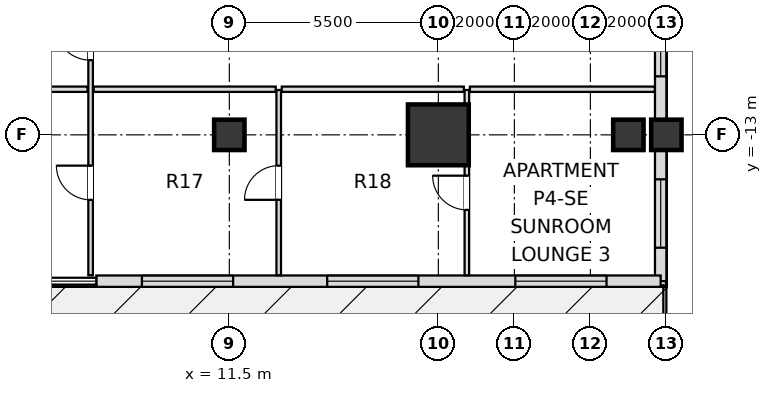
"""IFC4 building model, lengths in metres.
Left out: names, types, materials, properties, quantities, classifications, styles, units other than length and angle.
Written with IfcOpenShell. Run it as: python <this file> out.ifc"""

import sys

from ifc_helpers import new_model, si_unit, direction, frame, frame_2d, origin, origin_2d, place, context, subcontext, project, spatial, rectangle, extrude, element, fill, save


model = new_model("IFC4")
c1 = context("Model", 3, precision=1e-05, world=origin(), true_north=direction((0.0, 1.0)))
c2 = subcontext(c1, "Body", "Model", "MODEL_VIEW")
j1 = project(units=[si_unit("LENGTHUNIT", "METRE"), si_unit("PLANEANGLEUNIT", "RADIAN")], contexts=[c1])
p1 = place(None, origin())
s1 = spatial("IfcSite", under=j1, at=p1, CompositionType="ELEMENT")
p2 = place(p1, origin())
s2 = spatial("IfcBuilding", under=s1, at=p2, CompositionType="ELEMENT")
p3 = place(p2, frame((0.0, 0.0, 22.2)))
s3 = spatial("IfcBuildingStorey", under=s2, at=p3, CompositionType="ELEMENT", Elevation=22.2)
p4 = place(p3, frame((17.0, -13.0, 0.0), z_axis=(0.0, 0.0, 1.0), x_axis=(1.0, 0.0, 0.0)))
e1 = element("IfcColumn", 1, at=p4, inside=s3, PredefinedType="USERDEFINED", context=c2, shape_type="SweptSolid", body=[
    extrude(rectangle(XDim=1.6, YDim=1.6, at=origin_2d()), origin(), (0.0, 0.0, 1.0), 5.4),
])
for number, where, z_axis, x_axis in (
    (2, (23.0, -13.0, 0.0), (0.0, 0.0, 1.0), (1.0, 0.0, 0.0)),
    (3, (11.5, -13.0, 0.0), (0.0, 0.0, 1.0), (1.0, 0.0, 0.0)),
    (4, (22.0, -13.0, 0.0), (0.0, 0.0, 1.0), (1.0, 0.0, 0.0)),
):
    element("IfcColumn", number, at=place(p3, frame(where, z_axis=z_axis, x_axis=x_axis)), inside=s3, PredefinedType="COLUMN", context=c2, shape_type="SweptSolid", body=[
        extrude(rectangle(XDim=0.8, YDim=0.8, at=origin_2d()), origin(), (0.0, 0.0, 1.0), 5.4),
    ])
p5 = place(p3, frame((22.85, -16.85, 0.0), z_axis=(0.0, 0.0, 1.0), x_axis=(0.0, 1.0, 0.0)))
e5 = element("IfcWall", 5, at=p5, inside=s3, PredefinedType="SOLIDWALL", context=c2, shape_type="SweptSolid", body=[
    extrude(rectangle(XDim=33.7, YDim=0.3, at=frame_2d((16.85, 0.0))), origin(), (0.0, 0.0, 1.0), 2.985),
])
p6 = place(p5, frame((0.88, 0.0, 0.72)))
e6 = element("IfcOpeningElement", 6, at=p6, cuts=e5, PredefinedType="OPENING", context=c2, shape_type="SweptSolid", body=[
    extrude(rectangle(XDim=1.8, YDim=1.68, at=frame_2d((0.9, 0.84))), frame((0.0, 0.16, 0.0), z_axis=(0.0, -1.0, 0.0), x_axis=(1.0, 0.0, 0.0)), (0.0, 0.0, 1.0), 0.32),
])
p7 = place(p5, frame((5.39, 0.0, 0.72)))
e7 = element("IfcOpeningElement", 7, at=p7, cuts=e5, PredefinedType="OPENING", context=c2, shape_type="SweptSolid", body=[
    extrude(rectangle(XDim=1.8, YDim=1.68, at=frame_2d((0.9, 0.84))), frame((0.0, 0.16, 0.0), z_axis=(0.0, -1.0, 0.0), x_axis=(1.0, 0.0, 0.0)), (0.0, 0.0, 1.0), 0.32),
])
p8 = place(p5, frame((7.85, 0.0, 0.72)))
e8 = element("IfcOpeningElement", 8, at=p8, cuts=e5, PredefinedType="OPENING", context=c2, shape_type="SweptSolid", body=[
    extrude(rectangle(XDim=1.2, YDim=1.68, at=frame_2d((0.6, 0.84))), frame((0.0, 0.16, 0.0), z_axis=(0.0, -1.0, 0.0), x_axis=(1.0, 0.0, 0.0)), (0.0, 0.0, 1.0), 0.32),
])
p9 = place(p5, frame((11.205, 0.0, 0.72)))
e9 = element("IfcOpeningElement", 9, at=p9, cuts=e5, PredefinedType="OPENING", context=c2, shape_type="SweptSolid", body=[
    extrude(rectangle(XDim=1.8, YDim=1.68, at=frame_2d((0.9, 0.84))), frame((0.0, 0.16, 0.0), z_axis=(0.0, -1.0, 0.0), x_axis=(1.0, 0.0, 0.0)), (0.0, 0.0, 1.0), 0.32),
])
p10 = place(p5, frame((16.395, 0.0, 0.72)))
e10 = element("IfcOpeningElement", 10, at=p10, cuts=e5, PredefinedType="OPENING", context=c2, shape_type="SweptSolid", body=[
    extrude(rectangle(XDim=1.8, YDim=1.68, at=frame_2d((0.9, 0.84))), frame((0.0, 0.16, 0.0), z_axis=(0.0, -1.0, 0.0), x_axis=(1.0, 0.0, 0.0)), (0.0, 0.0, 1.0), 0.32),
])
p11 = place(p5, frame((21.3, 0.0, 0.72)))
e11 = element("IfcOpeningElement", 11, at=p11, cuts=e5, PredefinedType="OPENING", context=c2, shape_type="SweptSolid", body=[
    extrude(rectangle(XDim=1.8, YDim=1.68, at=frame_2d((0.9, 0.84))), frame((0.0, 0.16, 0.0), z_axis=(0.0, -1.0, 0.0), x_axis=(1.0, 0.0, 0.0)), (0.0, 0.0, 1.0), 0.32),
])
p12 = place(p5, frame((24.65, 0.0, 0.72)))
e12 = element("IfcOpeningElement", 12, at=p12, cuts=e5, PredefinedType="OPENING", context=c2, shape_type="SweptSolid", body=[
    extrude(rectangle(XDim=1.2, YDim=1.68, at=frame_2d((0.6, 0.84))), frame((0.0, 0.16, 0.0), z_axis=(0.0, -1.0, 0.0), x_axis=(1.0, 0.0, 0.0)), (0.0, 0.0, 1.0), 0.32),
])
p13 = place(p5, frame((26.88, 0.0, 0.72)))
e13 = element("IfcOpeningElement", 13, at=p13, cuts=e5, PredefinedType="OPENING", context=c2, shape_type="SweptSolid", body=[
    extrude(rectangle(XDim=1.8, YDim=1.68, at=frame_2d((0.9, 0.84))), frame((0.0, 0.16, 0.0), z_axis=(0.0, -1.0, 0.0), x_axis=(1.0, 0.0, 0.0)), (0.0, 0.0, 1.0), 0.32),
])
p14 = place(p5, frame((31.02, 0.0, 0.72)))
e14 = element("IfcOpeningElement", 14, at=p14, cuts=e5, PredefinedType="OPENING", context=c2, shape_type="SweptSolid", body=[
    extrude(rectangle(XDim=1.8, YDim=1.68, at=frame_2d((0.9, 0.84))), frame((0.0, 0.16, 0.0), z_axis=(0.0, -1.0, 0.0), x_axis=(1.0, 0.0, 0.0)), (0.0, 0.0, 1.0), 0.32),
])
p15 = place(p3, frame((22.85, -16.85, 0.0), z_axis=(0.0, 0.0, 1.0), x_axis=(-1.0, 0.0, 0.0)))
e15 = element("IfcWall", 15, at=p15, inside=s3, PredefinedType="SOLIDWALL", context=c2, shape_type="SweptSolid", body=[
    extrude(rectangle(XDim=14.85, YDim=0.3, at=frame_2d((7.425, 0.0))), origin(), (0.0, 0.0, 1.0), 4.356),
])
p16 = place(p15, frame((1.425, 0.0, 0.8)))
e16 = element("IfcOpeningElement", 16, at=p16, cuts=e15, PredefinedType="OPENING", context=c2, shape_type="SweptSolid", body=[
    extrude(rectangle(XDim=2.4, YDim=2.2, at=frame_2d((1.2, 1.1))), frame((0.0, 0.16, 0.0), z_axis=(0.0, -1.0, 0.0), x_axis=(1.0, 0.0, 0.0)), (0.0, 0.0, 1.0), 0.32),
])
p17 = place(p15, frame((6.375, 0.0, 0.8)))
e17 = element("IfcOpeningElement", 17, at=p17, cuts=e15, PredefinedType="OPENING", context=c2, shape_type="SweptSolid", body=[
    extrude(rectangle(XDim=2.4, YDim=2.2, at=frame_2d((1.2, 1.1))), frame((0.0, 0.16, 0.0), z_axis=(0.0, -1.0, 0.0), x_axis=(1.0, 0.0, 0.0)), (0.0, 0.0, 1.0), 0.32),
])
p18 = place(p15, frame((11.25, 0.0, 0.8)))
e18 = element("IfcOpeningElement", 18, at=p18, cuts=e15, PredefinedType="OPENING", context=c2, shape_type="SweptSolid", body=[
    extrude(rectangle(XDim=2.4, YDim=2.2, at=frame_2d((1.2, 1.1))), frame((0.0, 0.16, 0.0), z_axis=(0.0, -1.0, 0.0), x_axis=(1.0, 0.0, 0.0)), (0.0, 0.0, 1.0), 0.32),
])
p19 = place(p3, frame((7.85, -16.695, 0.0), z_axis=(0.0, 0.0, 1.0), x_axis=(0.0, 1.0, 0.0)))
e19 = element("IfcWall", 19, at=p19, inside=s3, PredefinedType="PARTITIONING", context=c2, shape_type="SweptSolid", body=[
    extrude(rectangle(XDim=7.395, YDim=0.12, at=frame_2d((3.698, 0.0))), origin(), (0.0, 0.0, 1.0), 4.436),
])
p20 = place(p19, frame((5.66, 0.0, 0.0)))
e20 = element("IfcOpeningElement", 20, at=p20, cuts=e19, PredefinedType="OPENING", context=c2, shape_type="SweptSolid", body=[
    extrude(rectangle(XDim=0.95, YDim=2.1, at=frame_2d((0.475, 1.05))), frame((0.0, 0.07, 0.0), z_axis=(0.0, -1.0, 0.0), x_axis=(1.0, 0.0, 0.0)), (0.0, 0.0, 1.0), 0.14),
])
p21 = place(p19, frame((1.985, 0.0, 0.0)))
e21 = element("IfcOpeningElement", 21, at=p21, cuts=e19, PredefinedType="OPENING", context=c2, shape_type="SweptSolid", body=[
    extrude(rectangle(XDim=0.9, YDim=2.1, at=frame_2d((0.45, 1.05))), frame((0.0, 0.07, 0.0), z_axis=(0.0, -1.0, 0.0), x_axis=(1.0, 0.0, 0.0)), (0.0, 0.0, 1.0), 0.14),
])
p22 = place(p3, frame((12.8, -16.695, 0.0), z_axis=(0.0, 0.0, 1.0), x_axis=(0.0, 1.0, 0.0)))
e22 = element("IfcWall", 22, at=p22, inside=s3, PredefinedType="PARTITIONING", context=c2, shape_type="SweptSolid", body=[
    extrude(rectangle(XDim=4.875, YDim=0.12, at=frame_2d((2.438, 0.0))), origin(), (0.0, 0.0, 1.0), 4.356),
])
p23 = place(p22, frame((1.985, 0.0, 0.0)))
e23 = element("IfcOpeningElement", 23, at=p23, cuts=e22, PredefinedType="OPENING", context=c2, shape_type="SweptSolid", body=[
    extrude(rectangle(XDim=0.9, YDim=2.1, at=frame_2d((0.45, 1.05))), frame((0.0, 0.07, 0.0), z_axis=(0.0, -1.0, 0.0), x_axis=(1.0, 0.0, 0.0)), (0.0, 0.0, 1.0), 0.14),
])
p24 = place(p3, frame((17.75, -16.695, 0.0), z_axis=(0.0, 0.0, 1.0), x_axis=(0.0, 1.0, 0.0)))
e24 = element("IfcWall", 24, at=p24, inside=s3, PredefinedType="PARTITIONING", context=c2, shape_type="SweptSolid", body=[
    extrude(rectangle(XDim=4.875, YDim=0.12, at=frame_2d((2.438, 0.0))), origin(), (0.0, 0.0, 1.0), 2.985),
])
p25 = place(p24, frame((1.721, 0.0, 0.0)))
e25 = element("IfcOpeningElement", 25, at=p25, cuts=e24, PredefinedType="OPENING", context=c2, shape_type="SweptSolid", body=[
    extrude(rectangle(XDim=0.9, YDim=2.1, at=frame_2d((0.45, 1.05))), frame((0.0, 0.07, 0.0), z_axis=(0.0, -1.0, 0.0), x_axis=(1.0, 0.0, 0.0)), (0.0, 0.0, 1.0), 0.14),
])
p26 = place(p3, frame((4.73, -11.8, 0.0), z_axis=(0.0, 0.0, 1.0), x_axis=(1.0, 0.0, 0.0)))
e26 = element("IfcWall", 26, at=p26, inside=s3, PredefinedType="PARTITIONING", context=c2, shape_type="SweptSolid", body=[
    extrude(rectangle(XDim=3.04, YDim=0.14, at=frame_2d((1.52, 0.0))), origin(), (0.0, 0.0, 1.0), 4.436),
])
p27 = place(p3, frame((7.93, -11.8, 0.0), z_axis=(0.0, 0.0, 1.0), x_axis=(1.0, 0.0, 0.0)))
e27 = element("IfcWall", 27, at=p27, inside=s3, PredefinedType="PARTITIONING", context=c2, shape_type="SweptSolid", body=[
    extrude(rectangle(XDim=4.79, YDim=0.14, at=frame_2d((2.395, 0.0))), origin(), (0.0, 0.0, 1.0), 5.0),
])
p28 = place(p3, frame((12.88, -11.8, 0.0), z_axis=(0.0, 0.0, 1.0), x_axis=(1.0, 0.0, 0.0)))
e28 = element("IfcWall", 28, at=p28, inside=s3, PredefinedType="PARTITIONING", context=c2, shape_type="SweptSolid", body=[
    extrude(rectangle(XDim=4.79, YDim=0.14, at=frame_2d((2.395, 0.0))), origin(), (0.0, 0.0, 1.0), 4.436),
])
p29 = place(p3, frame((17.83, -11.8, 0.0), z_axis=(0.0, 0.0, 1.0), x_axis=(1.0, 0.0, 0.0)))
e29 = element("IfcWall", 29, at=p29, inside=s3, PredefinedType="PARTITIONING", context=c2, shape_type="SweptSolid", body=[
    extrude(rectangle(XDim=4.865, YDim=0.14, at=frame_2d((2.433, 0.0))), origin(), (0.0, 0.0, 1.0), 4.356),
])
p30 = place(p6, origin())
e30 = element("IfcWindow", 30, at=p30, inside=s3, PartitioningType="SINGLE_PANEL", PredefinedType="WINDOW", context=c2, shape_type="SweptSolid", body=[
    extrude(rectangle(XDim=1.8, YDim=1.68, at=frame_2d((0.9, 0.84))), frame((0.0, 0.03, 0.0), z_axis=(0.0, -1.0, 0.0), x_axis=(1.0, 0.0, 0.0)), (0.0, 0.0, 1.0), 0.06),
])
fill(e6, e30)
p31 = place(p7, origin())
e31 = element("IfcWindow", 31, at=p31, inside=s3, PartitioningType="SINGLE_PANEL", PredefinedType="WINDOW", context=c2, shape_type="SweptSolid", body=[
    extrude(rectangle(XDim=1.8, YDim=1.68, at=frame_2d((0.9, 0.84))), frame((0.0, 0.03, 0.0), z_axis=(0.0, -1.0, 0.0), x_axis=(1.0, 0.0, 0.0)), (0.0, 0.0, 1.0), 0.06),
])
fill(e7, e31)
p32 = place(p16, origin())
e32 = element("IfcWindow", 32, at=p32, inside=s3, PartitioningType="SINGLE_PANEL", PredefinedType="WINDOW", context=c2, shape_type="SweptSolid", body=[
    extrude(rectangle(XDim=2.4, YDim=2.2, at=frame_2d((1.2, 1.1))), frame((0.0, 0.03, 0.0), z_axis=(0.0, -1.0, 0.0), x_axis=(1.0, 0.0, 0.0)), (0.0, 0.0, 1.0), 0.06),
])
fill(e16, e32)
p33 = place(p17, origin())
e33 = element("IfcWindow", 33, at=p33, inside=s3, PartitioningType="SINGLE_PANEL", PredefinedType="WINDOW", context=c2, shape_type="SweptSolid", body=[
    extrude(rectangle(XDim=2.4, YDim=2.2, at=frame_2d((1.2, 1.1))), frame((0.0, 0.03, 0.0), z_axis=(0.0, -1.0, 0.0), x_axis=(1.0, 0.0, 0.0)), (0.0, 0.0, 1.0), 0.06),
])
fill(e17, e33)
p34 = place(p18, origin())
e34 = element("IfcWindow", 34, at=p34, inside=s3, PartitioningType="SINGLE_PANEL", PredefinedType="WINDOW", context=c2, shape_type="SweptSolid", body=[
    extrude(rectangle(XDim=2.4, YDim=2.2, at=frame_2d((1.2, 1.1))), frame((0.0, 0.03, 0.0), z_axis=(0.0, -1.0, 0.0), x_axis=(1.0, 0.0, 0.0)), (0.0, 0.0, 1.0), 0.06),
])
fill(e18, e34)
p35 = place(p20, origin())
e35 = element("IfcDoor", 35, at=p35, inside=s3, OperationType="SINGLE_SWING_RIGHT", PredefinedType="DOOR", context=c2, shape_type="SweptSolid", body=[
    extrude(rectangle(XDim=0.95, YDim=2.1, at=frame_2d((0.475, 1.05))), frame((0.0, 0.025, 0.0), z_axis=(0.0, -1.0, 0.0), x_axis=(1.0, 0.0, 0.0)), (0.0, 0.0, 1.0), 0.05),
])
fill(e20, e35)
p36 = place(p21, origin())
e36 = element("IfcDoor", 36, at=p36, inside=s3, OperationType="SINGLE_SWING_RIGHT", PredefinedType="DOOR", context=c2, shape_type="SweptSolid", body=[
    extrude(rectangle(XDim=0.9, YDim=2.1, at=frame_2d((0.45, 1.05))), frame((0.0, 0.025, 0.0), z_axis=(0.0, -1.0, 0.0), x_axis=(1.0, 0.0, 0.0)), (0.0, 0.0, 1.0), 0.05),
])
fill(e21, e36)
p37 = place(p23, origin())
e37 = element("IfcDoor", 37, at=p37, inside=s3, OperationType="SINGLE_SWING_LEFT", PredefinedType="DOOR", context=c2, shape_type="SweptSolid", body=[
    extrude(rectangle(XDim=0.9, YDim=2.1, at=frame_2d((0.45, 1.05))), frame((0.0, 0.025, 0.0), z_axis=(0.0, -1.0, 0.0), x_axis=(1.0, 0.0, 0.0)), (0.0, 0.0, 1.0), 0.05),
])
fill(e23, e37)
p38 = place(p25, origin())
e38 = element("IfcDoor", 38, at=p38, inside=s3, OperationType="SINGLE_SWING_RIGHT", PredefinedType="DOOR", context=c2, shape_type="SweptSolid", body=[
    extrude(rectangle(XDim=0.9, YDim=2.1, at=frame_2d((0.45, 1.05))), frame((0.0, 0.025, 0.0), z_axis=(0.0, -1.0, 0.0), x_axis=(1.0, 0.0, 0.0)), (0.0, 0.0, 1.0), 0.05),
])
fill(e25, e38)
save(model, sys.argv[1])
